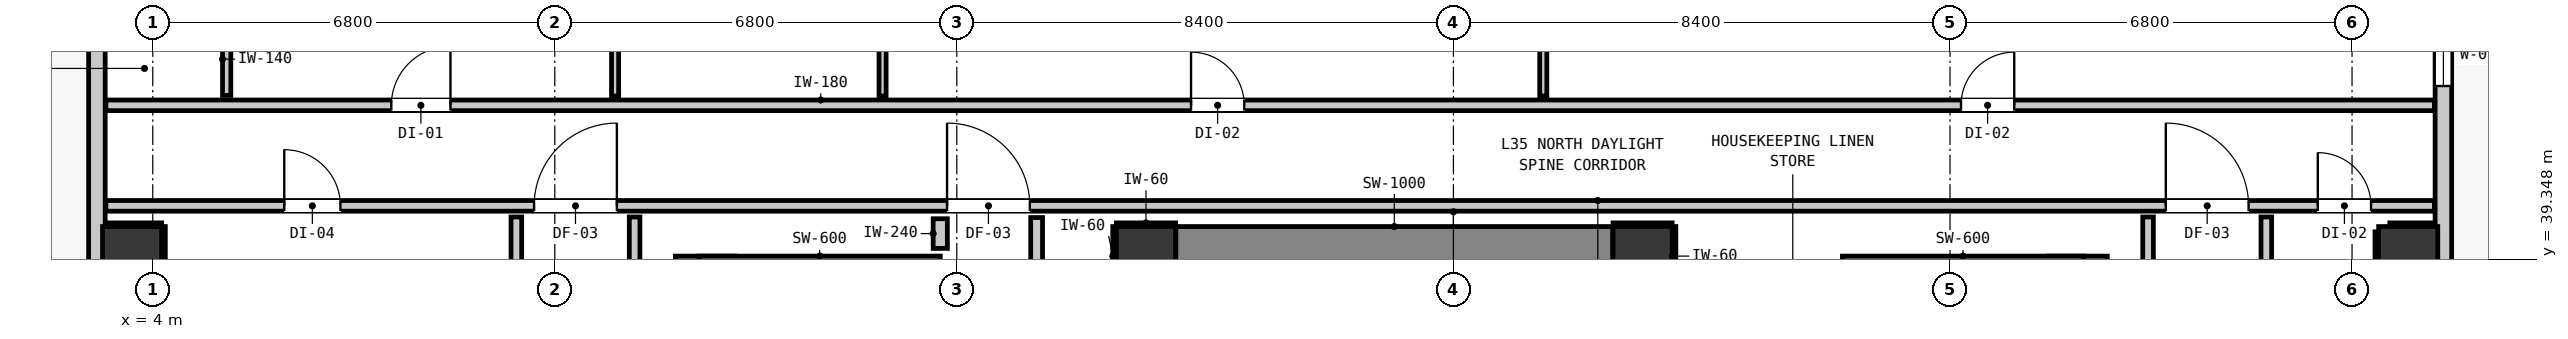
"""IFC4 building model, lengths in metres.
Left out: names, types, materials, properties, quantities, classifications, styles, units other than length and angle.
Written with IfcOpenShell. Run it as: python <this file> out.ifc"""

import sys

from ifc_helpers import new_model, si_unit, direction, frame, frame_2d, origin, origin_2d, place, context, subcontext, project, spatial, rectangle, extrude, element, fill, save


model = new_model("IFC4")
c1 = context("Model", 3, precision=1e-05, world=origin(), true_north=direction((0.0, 1.0)))
c2 = subcontext(c1, "Body", "Model", "MODEL_VIEW")
j1 = project(units=[si_unit("LENGTHUNIT", "METRE"), si_unit("PLANEANGLEUNIT", "RADIAN")], contexts=[c1])
p1 = place(None, origin())
s1 = spatial("IfcSite", under=j1, at=p1, CompositionType="ELEMENT")
p2 = place(p1, origin())
s2 = spatial("IfcBuilding", under=s1, at=p2, CompositionType="ELEMENT")
p3 = place(p2, frame((0.0, 0.0, 122.68)))
s3 = spatial("IfcBuildingStorey", under=s2, at=p3, CompositionType="ELEMENT", Elevation=122.68)
for number, where, z_axis, x_axis in (
    (1, (20.8, 39.4, 0.0), (0.0, 0.0, 1.0), (1.0, 0.0, 0.0)),
    (2, (29.2, 39.4, 0.0), (0.0, 0.0, 1.0), (1.0, 0.0, 0.0)),
):
    element("IfcColumn", number, at=place(p3, frame(where, z_axis=z_axis, x_axis=x_axis)), inside=s3, PredefinedType="COLUMN", context=c2, shape_type="SweptSolid", body=[
        extrude(rectangle(XDim=1.0, YDim=1.0, at=origin_2d()), origin(), (0.0, 0.0, 1.0), 3.32),
    ])
p4 = place(p3, frame((13.34, 31.205, 0.0), z_axis=(0.0, 0.0, 1.0), x_axis=(0.0, 1.0, 0.0)))
e3 = element("IfcWall", 3, at=p4, inside=s3, PredefinedType="SHEAR", context=c2, shape_type="SweptSolid", body=[
    extrude(rectangle(XDim=8.195, YDim=1.0, at=frame_2d((4.097, 0.0))), origin(), (0.0, 0.0, 1.0), 3.32),
])
p5 = place(p3, frame((13.24, 39.1, 0.0), z_axis=(0.0, 0.0, 1.0), x_axis=(1.0, 0.0, 0.0)))
e4 = element("IfcWall", 4, at=p5, inside=s3, PredefinedType="SHEAR", context=c2, shape_type="SweptSolid", body=[
    extrude(rectangle(XDim=4.08, YDim=0.6, at=frame_2d((2.04, 0.0))), origin(), (0.0, 0.0, 1.0), 3.32),
])
p6 = place(p3, frame((36.56, 31.205, 0.0), z_axis=(0.0, 0.0, 1.0), x_axis=(0.0, 1.0, 0.0)))
e5 = element("IfcWall", 5, at=p6, inside=s3, PredefinedType="SHEAR", context=c2, shape_type="SweptSolid", body=[
    extrude(rectangle(XDim=8.195, YDim=1.0, at=frame_2d((4.097, 0.0))), origin(), (0.0, 0.0, 1.0), 3.32),
])
p7 = place(p3, frame((32.58, 39.1, 0.0), z_axis=(0.0, 0.0, 1.0), x_axis=(1.0, 0.0, 0.0)))
e6 = element("IfcWall", 6, at=p7, inside=s3, PredefinedType="SHEAR", context=c2, shape_type="SweptSolid", body=[
    extrude(rectangle(XDim=4.08, YDim=0.6, at=frame_2d((2.04, 0.0))), origin(), (0.0, 0.0, 1.0), 3.32),
])
p8 = place(p3, frame((21.305, 39.4, 0.0), z_axis=(0.0, 0.0, 1.0), x_axis=(1.0, 0.0, 0.0)))
e7 = element("IfcWall", 7, at=p8, inside=s3, PredefinedType="SHEAR", context=c2, shape_type="SweptSolid", body=[
    extrude(rectangle(XDim=7.39, YDim=1.0, at=frame_2d((3.695, 0.0))), origin(), (0.0, 0.0, 1.0), 3.32),
])
for number, where, z_axis, x_axis in (
    (8, (3.65, 39.4, 0.0), (0.0, 0.0, 1.0), (1.0, 0.0, 0.0)),
    (9, (42.15, 39.4, 0.0), (0.0, 0.0, 1.0), (1.0, 0.0, 0.0)),
):
    element("IfcColumn", number, at=place(p3, frame(where, z_axis=z_axis, x_axis=x_axis)), inside=s3, PredefinedType="COLUMN", context=c2, shape_type="SweptSolid", body=[
        extrude(rectangle(XDim=1.0, YDim=1.0, at=origin_2d()), origin(), (0.0, 0.0, 1.0), 2.9),
    ])
p9 = place(p3, frame((3.055, 11.355, 0.0), z_axis=(0.0, 0.0, 1.0), x_axis=(0.0, 1.0, 0.0)))
e10 = element("IfcWall", 10, at=p9, inside=s3, PredefinedType="STANDARD", context=c2, shape_type="SweptSolid", body=[
    extrude(rectangle(XDim=32.29, YDim=0.28, at=frame_2d((16.145, 0.0))), origin(), (0.0, 0.0, 1.0), 2.9),
])
p10 = place(p9, frame((5.818, 0.0, 0.0)))
e11 = element("IfcOpeningElement", 11, at=p10, cuts=e10, PredefinedType="OPENING", context=c2, shape_type="SweptSolid", body=[
    extrude(rectangle(XDim=1.0, YDim=2.15, at=frame_2d((0.5, 1.075))), frame((0.0, 0.15, 0.0), z_axis=(0.0, -1.0, 0.0), x_axis=(1.0, 0.0, 0.0)), (0.0, 0.0, 1.0), 0.3),
])
p11 = place(p9, frame((0.47, 0.0, 0.85)))
e12 = element("IfcOpeningElement", 12, at=p11, cuts=e10, PredefinedType="OPENING", context=c2, shape_type="SweptSolid", body=[
    extrude(rectangle(XDim=1.2, YDim=1.8, at=frame_2d((0.6, 0.9))), frame((0.0, 0.15, 0.0), z_axis=(0.0, -1.0, 0.0), x_axis=(1.0, 0.0, 0.0)), (0.0, 0.0, 1.0), 0.3),
])
p12 = place(p9, frame((14.395, 0.0, 0.85)))
e13 = element("IfcOpeningElement", 13, at=p12, cuts=e10, PredefinedType="OPENING", context=c2, shape_type="SweptSolid", body=[
    extrude(rectangle(XDim=1.2, YDim=1.8, at=frame_2d((0.6, 0.9))), frame((0.0, 0.15, 0.0), z_axis=(0.0, -1.0, 0.0), x_axis=(1.0, 0.0, 0.0)), (0.0, 0.0, 1.0), 0.3),
])
p13 = place(p3, frame((42.745, 43.645, 0.0), z_axis=(0.0, 0.0, 1.0), x_axis=(0.0, -1.0, 0.0)))
e14 = element("IfcWall", 14, at=p13, inside=s3, PredefinedType="STANDARD", context=c2, shape_type="SweptSolid", body=[
    extrude(rectangle(XDim=32.29, YDim=0.28, at=frame_2d((16.145, 0.0))), origin(), (0.0, 0.0, 1.0), 2.9),
])
p14 = place(p13, frame((5.467, 0.0, 0.0)))
e15 = element("IfcOpeningElement", 15, at=p14, cuts=e14, PredefinedType="OPENING", context=c2, shape_type="SweptSolid", body=[
    extrude(rectangle(XDim=1.0, YDim=2.15, at=frame_2d((0.5, 1.075))), frame((0.0, 0.15, 0.0), z_axis=(0.0, -1.0, 0.0), x_axis=(1.0, 0.0, 0.0)), (0.0, 0.0, 1.0), 0.3),
])
p15 = place(p13, frame((28.998, 0.0, 0.85)))
e16 = element("IfcOpeningElement", 16, at=p15, cuts=e14, PredefinedType="OPENING", context=c2, shape_type="SweptSolid", body=[
    extrude(rectangle(XDim=1.2, YDim=1.8, at=frame_2d((0.6, 0.9))), frame((0.0, 0.15, 0.0), z_axis=(0.0, -1.0, 0.0), x_axis=(1.0, 0.0, 0.0)), (0.0, 0.0, 1.0), 0.3),
])
p16 = place(p13, frame((0.318, 0.0, 0.85)))
e17 = element("IfcOpeningElement", 17, at=p16, cuts=e14, PredefinedType="OPENING", context=c2, shape_type="SweptSolid", body=[
    extrude(rectangle(XDim=1.05, YDim=1.65, at=frame_2d((0.525, 0.825))), frame((0.0, 0.15, 0.0), z_axis=(0.0, -1.0, 0.0), x_axis=(1.0, 0.0, 0.0)), (0.0, 0.0, 1.0), 0.3),
])
p17 = place(p13, frame((15.783, 0.0, 0.85)))
e18 = element("IfcOpeningElement", 18, at=p17, cuts=e14, PredefinedType="OPENING", context=c2, shape_type="SweptSolid", body=[
    extrude(rectangle(XDim=1.2, YDim=1.8, at=frame_2d((0.6, 0.9))), frame((0.0, 0.15, 0.0), z_axis=(0.0, -1.0, 0.0), x_axis=(1.0, 0.0, 0.0)), (0.0, 0.0, 1.0), 0.3),
])
p18 = place(p3, frame((3.207, 40.25, 0.0), z_axis=(0.0, 0.0, 1.0), x_axis=(1.0, 0.0, 0.0)))
e19 = element("IfcWall", 19, at=p18, inside=s3, PredefinedType="PARTITIONING", context=c2, shape_type="SweptSolid", body=[
    extrude(rectangle(XDim=39.386, YDim=0.18, at=frame_2d((19.693, 0.0))), origin(), (0.0, 0.0, 1.0), 2.9),
])
p19 = place(p18, frame((14.228, 0.0, 0.0)))
e20 = element("IfcOpeningElement", 20, at=p19, cuts=e19, PredefinedType="OPENING", context=c2, shape_type="SweptSolid", body=[
    extrude(rectangle(XDim=1.4, YDim=2.15, at=frame_2d((0.7, 1.075))), frame((0.0, 0.1, 0.0), z_axis=(0.0, -1.0, 0.0), x_axis=(1.0, 0.0, 0.0)), (0.0, 0.0, 1.0), 0.2),
])
p20 = place(p18, frame((7.243, 0.0, 0.0)))
e21 = element("IfcOpeningElement", 21, at=p20, cuts=e19, PredefinedType="OPENING", context=c2, shape_type="SweptSolid", body=[
    extrude(rectangle(XDim=1.4, YDim=2.15, at=frame_2d((0.7, 1.075))), frame((0.0, 0.1, 0.0), z_axis=(0.0, -1.0, 0.0), x_axis=(1.0, 0.0, 0.0)), (0.0, 0.0, 1.0), 0.2),
])
p21 = place(p18, frame((34.843, 0.0, 0.0)))
e22 = element("IfcOpeningElement", 22, at=p21, cuts=e19, PredefinedType="OPENING", context=c2, shape_type="SweptSolid", body=[
    extrude(rectangle(XDim=1.4, YDim=2.15, at=frame_2d((0.7, 1.075))), frame((0.0, 0.1, 0.0), z_axis=(0.0, -1.0, 0.0), x_axis=(1.0, 0.0, 0.0)), (0.0, 0.0, 1.0), 0.2),
])
p22 = place(p18, frame((3.017, 0.0, 0.0)))
e23 = element("IfcOpeningElement", 23, at=p22, cuts=e19, PredefinedType="OPENING", context=c2, shape_type="SweptSolid", body=[
    extrude(rectangle(XDim=0.95, YDim=2.1, at=frame_2d((0.475, 1.05))), frame((0.0, 0.1, 0.0), z_axis=(0.0, -1.0, 0.0), x_axis=(1.0, 0.0, 0.0)), (0.0, 0.0, 1.0), 0.2),
])
p23 = place(p18, frame((37.414, 0.0, 0.0)))
e24 = element("IfcOpeningElement", 24, at=p23, cuts=e19, PredefinedType="OPENING", context=c2, shape_type="SweptSolid", body=[
    extrude(rectangle(XDim=0.9, YDim=2.1, at=frame_2d((0.45, 1.05))), frame((0.0, 0.1, 0.0), z_axis=(0.0, -1.0, 0.0), x_axis=(1.0, 0.0, 0.0)), (0.0, 0.0, 1.0), 0.2),
])
p24 = place(p3, frame((3.207, 41.95, 0.0), z_axis=(0.0, 0.0, 1.0), x_axis=(1.0, 0.0, 0.0)))
e25 = element("IfcWall", 25, at=p24, inside=s3, PredefinedType="PARTITIONING", context=c2, shape_type="SweptSolid", body=[
    extrude(rectangle(XDim=39.386, YDim=0.18, at=frame_2d((19.693, 0.0))), origin(), (0.0, 0.0, 1.0), 2.9),
])
p25 = place(p24, frame((4.828, 0.0, 0.0)))
e26 = element("IfcOpeningElement", 26, at=p25, cuts=e25, PredefinedType="OPENING", context=c2, shape_type="SweptSolid", body=[
    extrude(rectangle(XDim=1.0, YDim=2.15, at=frame_2d((0.5, 1.075))), frame((0.0, 0.1, 0.0), z_axis=(0.0, -1.0, 0.0), x_axis=(1.0, 0.0, 0.0)), (0.0, 0.0, 1.0), 0.2),
])
p26 = place(p24, frame((18.355, 0.0, 0.0)))
e27 = element("IfcOpeningElement", 27, at=p26, cuts=e25, PredefinedType="OPENING", context=c2, shape_type="SweptSolid", body=[
    extrude(rectangle(XDim=0.9, YDim=2.1, at=frame_2d((0.45, 1.05))), frame((0.0, 0.1, 0.0), z_axis=(0.0, -1.0, 0.0), x_axis=(1.0, 0.0, 0.0)), (0.0, 0.0, 1.0), 0.2),
])
p27 = place(p24, frame((31.379, 0.0, 0.0)))
e28 = element("IfcOpeningElement", 28, at=p27, cuts=e25, PredefinedType="OPENING", context=c2, shape_type="SweptSolid", body=[
    extrude(rectangle(XDim=0.9, YDim=2.1, at=frame_2d((0.45, 1.05))), frame((0.0, 0.1, 0.0), z_axis=(0.0, -1.0, 0.0), x_axis=(1.0, 0.0, 0.0)), (0.0, 0.0, 1.0), 0.2),
])
p28 = place(p3, frame((17.32, 39.53, 0.0), z_axis=(0.0, 0.0, 1.0), x_axis=(0.0, 1.0, 0.0)))
e29 = element("IfcWall", 29, at=p28, inside=s3, PredefinedType="PARTITIONING", context=c2, shape_type="SweptSolid", body=[
    extrude(rectangle(XDim=0.502, YDim=0.24, at=frame_2d((0.251, 0.0))), origin(), (0.0, 0.0, 1.0), 2.9),
])
p29 = place(p3, frame((18.95, 38.918, 0.0), z_axis=(0.0, 0.0, 1.0), x_axis=(0.0, 1.0, 0.0)))
e30 = element("IfcWall", 30, at=p29, inside=s3, PredefinedType="PARTITIONING", context=c2, shape_type="SweptSolid", body=[
    extrude(rectangle(XDim=1.134, YDim=0.2, at=frame_2d((0.567, 0.0))), origin(), (0.0, 0.0, 1.0), 2.9),
])
p30 = place(p3, frame((10.15, 38.9, 0.0), z_axis=(0.0, 0.0, 1.0), x_axis=(0.0, 1.0, 0.0)))
e31 = element("IfcWall", 31, at=p30, inside=s3, PredefinedType="PARTITIONING", context=c2, shape_type="SweptSolid", body=[
    extrude(rectangle(XDim=1.162, YDim=0.18, at=frame_2d((0.581, 0.0))), origin(), (0.0, 0.0, 1.0), 2.9),
])
for number, where, z_axis, x_axis in (
    (32, (12.15, 21.368, 0.0), (0.0, 0.0, 1.0), (0.0, 1.0, 0.0)),
    (33, (37.75, 21.368, 0.0), (0.0, 0.0, 1.0), (0.0, 1.0, 0.0)),
):
    element("IfcWall", number, at=place(p3, frame(where, z_axis=z_axis, x_axis=x_axis)), inside=s3, PredefinedType="PARTITIONING", context=c2, shape_type="SweptSolid", body=[
        extrude(rectangle(XDim=18.694, YDim=0.18, at=frame_2d((9.347, 0.0))), origin(), (0.0, 0.0, 1.0), 2.9),
    ])
p31 = place(p3, frame((39.75, 34.158, 0.0), z_axis=(0.0, 0.0, 1.0), x_axis=(0.0, 1.0, 0.0)))
e34 = element("IfcWall", 34, at=p31, inside=s3, PredefinedType="PARTITIONING", context=c2, shape_type="SweptSolid", body=[
    extrude(rectangle(XDim=5.904, YDim=0.18, at=frame_2d((2.952, 0.0))), origin(), (0.0, 0.0, 1.0), 2.9),
])
p32 = place(p3, frame((5.25, 42.118, 0.0), z_axis=(0.0, 0.0, 1.0), x_axis=(0.0, 1.0, 0.0)))
e35 = element("IfcWall", 35, at=p32, inside=s3, PredefinedType="PARTITIONING", context=c2, shape_type="SweptSolid", body=[
    extrude(rectangle(XDim=3.507, YDim=0.14, at=frame_2d((1.753, 0.0))), origin(), (0.0, 0.0, 1.0), 2.9),
])
p33 = place(p32, frame((1.327, 0.0, 0.0)))
e36 = element("IfcOpeningElement", 36, at=p33, cuts=e35, PredefinedType="OPENING", context=c2, shape_type="SweptSolid", body=[
    extrude(rectangle(XDim=0.86, YDim=2.02, at=frame_2d((0.43, 1.01))), frame((0.0, 0.08, 0.0), z_axis=(0.0, -1.0, 0.0), x_axis=(1.0, 0.0, 0.0)), (0.0, 0.0, 1.0), 0.16),
])
p34 = place(p3, frame((11.82, 42.108, 0.0), z_axis=(0.0, 0.0, 1.0), x_axis=(0.0, 1.0, 0.0)))
e37 = element("IfcWall", 37, at=p34, inside=s3, PredefinedType="PARTITIONING", context=c2, shape_type="SweptSolid", body=[
    extrude(rectangle(XDim=3.685, YDim=0.12, at=frame_2d((1.843, 0.0))), origin(), (0.0, 0.0, 1.0), 2.9),
])
p35 = place(p34, frame((1.317, 0.0, 0.0)))
e38 = element("IfcOpeningElement", 38, at=p35, cuts=e37, PredefinedType="OPENING", context=c2, shape_type="SweptSolid", body=[
    extrude(rectangle(XDim=0.9, YDim=2.1, at=frame_2d((0.45, 1.05))), frame((0.0, 0.07, 0.0), z_axis=(0.0, -1.0, 0.0), x_axis=(1.0, 0.0, 0.0)), (0.0, 0.0, 1.0), 0.14),
])
for number, where, z_axis, x_axis in (
    (39, (16.344, 42.108, 0.0), (0.0, 0.0, 1.0), (0.0, 1.0, 0.0)),
    (40, (27.52, 42.108, 0.0), (0.0, 0.0, 1.0), (0.0, 1.0, 0.0)),
):
    element("IfcWall", number, at=place(p3, frame(where, z_axis=z_axis, x_axis=x_axis)), inside=s3, PredefinedType="PARTITIONING", context=c2, shape_type="SweptSolid", body=[
        extrude(rectangle(XDim=3.685, YDim=0.12, at=frame_2d((1.843, 0.0))), origin(), (0.0, 0.0, 1.0), 2.9),
    ])
for number, where, z_axis, x_axis in (
    (41, (20.3, 39.932, 0.0), (0.0, 0.0, 1.0), (1.0, 0.0, 0.0)),
    (42, (20.268, 38.9, 0.0), (0.0, 0.0, 1.0), (0.0, 1.0, 0.0)),
    (43, (28.7, 39.932, 0.0), (0.0, 0.0, 1.0), (1.0, 0.0, 0.0)),
    (44, (29.732, 38.9, 0.0), (0.0, 0.0, 1.0), (0.0, 1.0, 0.0)),
):
    element("IfcWall", number, at=place(p3, frame(where, z_axis=z_axis, x_axis=x_axis)), inside=s3, PredefinedType="PARTITIONING", context=c2, shape_type="SweptSolid", body=[
        extrude(rectangle(XDim=1.0, YDim=0.06, at=frame_2d((0.5, 0.0))), origin(), (0.0, 0.0, 1.0), 0.905),
    ])
p36 = place(p3, frame((3.21, 39.932, 0.0), z_axis=(0.0, 0.0, 1.0), x_axis=(1.0, 0.0, 0.0)))
e45 = element("IfcWall", 45, at=p36, inside=s3, PredefinedType="PARTITIONING", context=c2, shape_type="SweptSolid", body=[
    extrude(rectangle(XDim=0.94, YDim=0.06, at=frame_2d((0.47, 0.0))), origin(), (0.0, 0.0, 1.0), 0.905),
])
p37 = place(p3, frame((4.182, 38.9, 0.0), z_axis=(0.0, 0.0, 1.0), x_axis=(0.0, 1.0, 0.0)))
e46 = element("IfcWall", 46, at=p37, inside=s3, PredefinedType="PARTITIONING", context=c2, shape_type="SweptSolid", body=[
    extrude(rectangle(XDim=1.0, YDim=0.06, at=frame_2d((0.5, 0.0))), origin(), (0.0, 0.0, 1.0), 1.45),
])
p38 = place(p3, frame((41.839, 39.932, 0.0), z_axis=(0.0, 0.0, 1.0), x_axis=(1.0, 0.0, 0.0)))
e47 = element("IfcWall", 47, at=p38, inside=s3, PredefinedType="PARTITIONING", context=c2, shape_type="SweptSolid", body=[
    extrude(rectangle(XDim=0.751, YDim=0.06, at=frame_2d((0.375, 0.0))), origin(), (0.0, 0.0, 1.0), 0.905),
])
p39 = place(p3, frame((41.618, 38.9, 0.0), z_axis=(0.0, 0.0, 1.0), x_axis=(0.0, 1.0, 0.0)))
e48 = element("IfcWall", 48, at=p39, inside=s3, PredefinedType="PARTITIONING", context=c2, shape_type="SweptSolid", body=[
    extrude(rectangle(XDim=0.911, YDim=0.06, at=frame_2d((0.456, 0.0))), origin(), (0.0, 0.0, 1.0), 1.45),
])
p40 = place(p16, origin())
e49 = element("IfcWindow", 49, at=p40, inside=s3, PartitioningType="SINGLE_PANEL", PredefinedType="WINDOW", context=c2, shape_type="SweptSolid", body=[
    extrude(rectangle(XDim=1.05, YDim=1.65, at=frame_2d((0.525, 0.825))), frame((0.0, 0.03, 0.0), z_axis=(0.0, -1.0, 0.0), x_axis=(1.0, 0.0, 0.0)), (0.0, 0.0, 1.0), 0.06),
])
fill(e17, e49)
p41 = place(p19, origin())
e50 = element("IfcDoor", 50, at=p41, inside=s3, OperationType="SINGLE_SWING_LEFT", PredefinedType="DOOR", context=c2, shape_type="SweptSolid", body=[
    extrude(rectangle(XDim=1.4, YDim=2.15, at=frame_2d((0.7, 1.075))), frame((0.0, 0.025, 0.0), z_axis=(0.0, -1.0, 0.0), x_axis=(1.0, 0.0, 0.0)), (0.0, 0.0, 1.0), 0.05),
])
fill(e20, e50)
p42 = place(p20, origin())
e51 = element("IfcDoor", 51, at=p42, inside=s3, OperationType="SINGLE_SWING_RIGHT", PredefinedType="DOOR", context=c2, shape_type="SweptSolid", body=[
    extrude(rectangle(XDim=1.4, YDim=2.15, at=frame_2d((0.7, 1.075))), frame((0.0, 0.025, 0.0), z_axis=(0.0, -1.0, 0.0), x_axis=(1.0, 0.0, 0.0)), (0.0, 0.0, 1.0), 0.05),
])
fill(e21, e51)
p43 = place(p21, origin())
e52 = element("IfcDoor", 52, at=p43, inside=s3, OperationType="SINGLE_SWING_LEFT", PredefinedType="DOOR", context=c2, shape_type="SweptSolid", body=[
    extrude(rectangle(XDim=1.4, YDim=2.15, at=frame_2d((0.7, 1.075))), frame((0.0, 0.025, 0.0), z_axis=(0.0, -1.0, 0.0), x_axis=(1.0, 0.0, 0.0)), (0.0, 0.0, 1.0), 0.05),
])
fill(e22, e52)
p44 = place(p25, origin())
e53 = element("IfcDoor", 53, at=p44, inside=s3, OperationType="SINGLE_SWING_RIGHT", PredefinedType="DOOR", context=c2, shape_type="SweptSolid", body=[
    extrude(rectangle(XDim=1.0, YDim=2.15, at=frame_2d((0.5, 1.075))), frame((0.0, 0.025, 0.0), z_axis=(0.0, -1.0, 0.0), x_axis=(1.0, 0.0, 0.0)), (0.0, 0.0, 1.0), 0.05),
])
fill(e26, e53)
p45 = place(p26, origin())
e54 = element("IfcDoor", 54, at=p45, inside=s3, OperationType="SINGLE_SWING_LEFT", PredefinedType="DOOR", context=c2, shape_type="SweptSolid", body=[
    extrude(rectangle(XDim=0.9, YDim=2.1, at=frame_2d((0.45, 1.05))), frame((0.0, 0.025, 0.0), z_axis=(0.0, -1.0, 0.0), x_axis=(1.0, 0.0, 0.0)), (0.0, 0.0, 1.0), 0.05),
])
fill(e27, e54)
p46 = place(p27, origin())
e55 = element("IfcDoor", 55, at=p46, inside=s3, OperationType="SINGLE_SWING_RIGHT", PredefinedType="DOOR", context=c2, shape_type="SweptSolid", body=[
    extrude(rectangle(XDim=0.9, YDim=2.1, at=frame_2d((0.45, 1.05))), frame((0.0, 0.025, 0.0), z_axis=(0.0, -1.0, 0.0), x_axis=(1.0, 0.0, 0.0)), (0.0, 0.0, 1.0), 0.05),
])
fill(e28, e55)
p47 = place(p22, origin())
e56 = element("IfcDoor", 56, at=p47, inside=s3, OperationType="SINGLE_SWING_LEFT", PredefinedType="DOOR", context=c2, shape_type="SweptSolid", body=[
    extrude(rectangle(XDim=0.95, YDim=2.1, at=frame_2d((0.475, 1.05))), frame((0.0, 0.025, 0.0), z_axis=(0.0, -1.0, 0.0), x_axis=(1.0, 0.0, 0.0)), (0.0, 0.0, 1.0), 0.05),
])
fill(e23, e56)
p48 = place(p23, origin())
e57 = element("IfcDoor", 57, at=p48, inside=s3, OperationType="SINGLE_SWING_LEFT", PredefinedType="DOOR", context=c2, shape_type="SweptSolid", body=[
    extrude(rectangle(XDim=0.9, YDim=2.1, at=frame_2d((0.45, 1.05))), frame((0.0, 0.025, 0.0), z_axis=(0.0, -1.0, 0.0), x_axis=(1.0, 0.0, 0.0)), (0.0, 0.0, 1.0), 0.05),
])
fill(e24, e57)
save(model, sys.argv[1])
